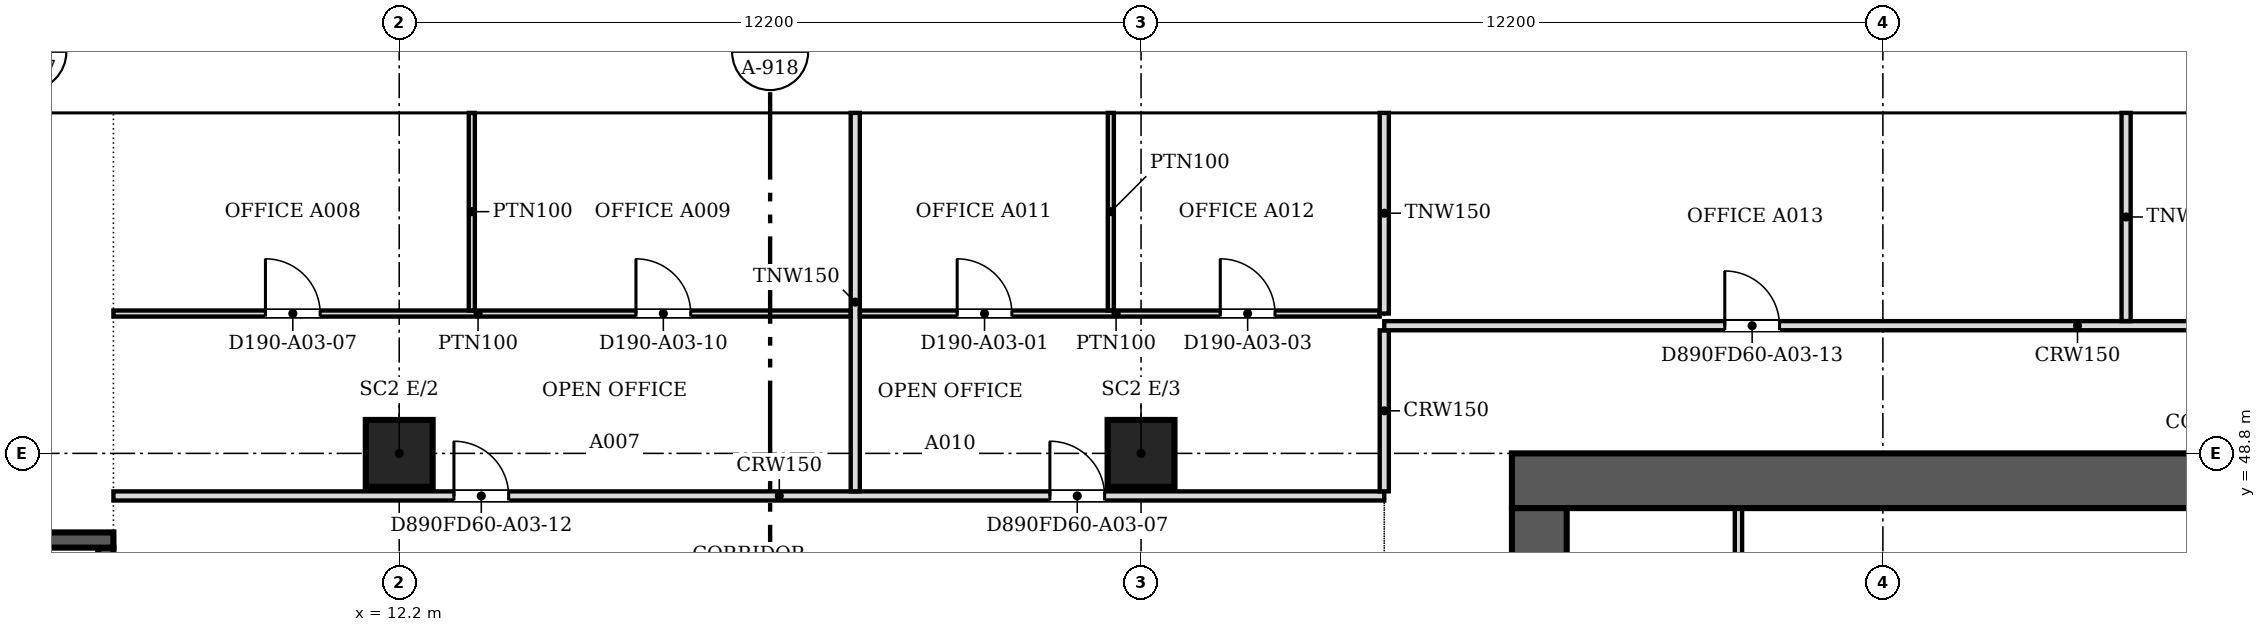
"""IFC4 building model, lengths in metres.
Left out: names, types, materials, properties, quantities, classifications, styles, units other than length and angle.
Written with IfcOpenShell. Run it as: python <this file> out.ifc"""

import sys

from ifc_helpers import new_model, si_unit, direction, frame, frame_2d, origin, origin_2d, place, context, subcontext, project, spatial, polyline, rectangle, outline, extrude, faceted_brep, source, transform, mapped, element, fill, save


model = new_model("IFC4")
c1 = context("Model", 3, precision=1e-05, world=origin(), true_north=direction((0.0, 1.0)))
c2 = subcontext(c1, "Body", "Model", "MODEL_VIEW")
j1 = project(units=[si_unit("LENGTHUNIT", "METRE"), si_unit("PLANEANGLEUNIT", "RADIAN")], contexts=[c1])
p1 = place(None, origin())
s1 = spatial("IfcSite", under=j1, at=p1, CompositionType="ELEMENT")
p2 = place(p1, origin())
s2 = spatial("IfcBuilding", under=s1, at=p2, CompositionType="ELEMENT")
p3 = place(p2, frame((0.0, 0.0, 41.0)))
s3 = spatial("IfcBuildingStorey", under=s2, at=p3, CompositionType="ELEMENT", Elevation=41.0)
for number, where, z_axis, x_axis in (
    (1, (12.2, 48.8, 0.0), (0.0, 0.0, 1.0), (1.0, 0.0, 0.0)),
    (2, (24.4, 48.8, 0.0), (0.0, 0.0, 1.0), (1.0, 0.0, 0.0)),
):
    element("IfcColumn", number, at=place(p3, frame(where, z_axis=z_axis, x_axis=x_axis)), inside=s3, PredefinedType="COLUMN", context=c2, shape_type="SweptSolid", body=[
        extrude(rectangle(XDim=1.1, YDim=1.1, at=origin_2d()), origin(), (0.0, 0.0, 1.0), 3.6),
    ])
m1 = source(origin(), c2, "Body", "SweptSolid", [
    extrude(outline(polyline([(3.05, 0.0), (6.1, 3.8), (3.05, 7.6), (0.0, 3.8), (3.05, 0.0)])), frame((0.0, 0.25, 0.0), z_axis=(0.0, -1.0, 0.0), x_axis=(1.0, 0.0, 0.0)), (0.0, 0.0, 1.0), 0.5),
])
p4 = place(p3, frame((45.75, 54.65, -3.8), z_axis=(0.0, 0.0, 1.0), x_axis=(-1.0, 0.0, 0.0)))
e3 = element("IfcWall", 3, at=p4, inside=s3, PredefinedType="SOLIDWALL", context=c2, shape_type="MappedRepresentation", body=[
    mapped(m1, transform((0.0, 0.0, 0.0), scale=1.0)),
])
m2 = source(origin(), c2, "Body", "SweptSolid", [
    extrude(outline(polyline([(3.05, 0.399), (5.78, 3.8), (3.05, 7.201), (0.321, 3.8), (3.05, 0.399)])), frame((0.0, 0.26, 0.0), z_axis=(0.0, -1.0, 0.0), x_axis=(1.0, 0.0, 0.0)), (0.0, 0.0, 1.0), 0.52),
])
p5 = place(p4, origin())
e4 = element("IfcOpeningElement", 4, at=p5, cuts=e3, PredefinedType="OPENING", context=c2, shape_type="MappedRepresentation", body=[
    mapped(m2, transform((0.0, 0.0, 0.0), scale=1.0)),
])
m3 = source(origin(), c2, "Body", "Brep", [
    faceted_brep([(3.05, -0.25, 0.0), (6.1, -0.25, 3.8), (6.1, -0.25, 3.8), (3.05, -0.25, 7.6), (0.0, -0.25, 3.8), (0.0, 0.25, 3.8), (3.05, 0.25, 7.6), (6.1, 0.25, 3.8), (6.1, 0.25, 3.8), (3.05, 0.25, 0.0)], [[[0, 1, 2, 3, 4]], [[5, 6, 7, 8, 9]], [[9, 8, 1, 0]], [[7, 6, 3, 2]], [[6, 5, 4, 3]], [[5, 9, 0, 4]], [[1, 8, 7, 2]]]),
])
p6 = place(p3, frame((39.65, 54.65, -3.8), z_axis=(0.0, 0.0, 1.0), x_axis=(-1.0, 0.0, 0.0)))
e5 = element("IfcWall", 5, at=p6, inside=s3, PredefinedType="SOLIDWALL", context=c2, shape_type="MappedRepresentation", body=[
    mapped(m3, transform((0.0, 0.0, 0.0), scale=1.0)),
])
p7 = place(p6, origin())
e6 = element("IfcOpeningElement", 6, at=p7, cuts=e5, PredefinedType="OPENING", context=c2, shape_type="MappedRepresentation", body=[
    mapped(m2, transform((0.0, 0.0, 0.0), scale=1.0)),
])
p8 = place(p3, frame((33.55, 54.65, -3.8), z_axis=(0.0, 0.0, 1.0), x_axis=(-1.0, 0.0, 0.0)))
e7 = element("IfcWall", 7, at=p8, inside=s3, PredefinedType="SOLIDWALL", context=c2, shape_type="MappedRepresentation", body=[
    mapped(m1, transform((0.0, 0.0, 0.0), scale=1.0)),
])
p9 = place(p8, origin())
e8 = element("IfcOpeningElement", 8, at=p9, cuts=e7, PredefinedType="OPENING", context=c2, shape_type="MappedRepresentation", body=[
    mapped(m2, transform((0.0, 0.0, 0.0), scale=1.0)),
])
p10 = place(p3, frame((27.45, 54.65, -3.8), z_axis=(0.0, 0.0, 1.0), x_axis=(-1.0, 0.0, 0.0)))
e9 = element("IfcWall", 9, at=p10, inside=s3, PredefinedType="SOLIDWALL", context=c2, shape_type="MappedRepresentation", body=[
    mapped(m3, transform((0.0, 0.0, 0.0), scale=1.0)),
])
p11 = place(p10, origin())
e10 = element("IfcOpeningElement", 10, at=p11, cuts=e9, PredefinedType="OPENING", context=c2, shape_type="MappedRepresentation", body=[
    mapped(m2, transform((0.0, 0.0, 0.0), scale=1.0)),
])
p12 = place(p3, frame((21.35, 54.65, -3.8), z_axis=(0.0, 0.0, 1.0), x_axis=(-1.0, 0.0, 0.0)))
e11 = element("IfcWall", 11, at=p12, inside=s3, PredefinedType="SOLIDWALL", context=c2, shape_type="MappedRepresentation", body=[
    mapped(m1, transform((0.0, 0.0, 0.0), scale=1.0)),
])
p13 = place(p12, origin())
e12 = element("IfcOpeningElement", 12, at=p13, cuts=e11, PredefinedType="OPENING", context=c2, shape_type="MappedRepresentation", body=[
    mapped(m2, transform((0.0, 0.0, 0.0), scale=1.0)),
])
p14 = place(p3, frame((15.25, 54.65, -3.8), z_axis=(0.0, 0.0, 1.0), x_axis=(-1.0, 0.0, 0.0)))
e13 = element("IfcWall", 13, at=p14, inside=s3, PredefinedType="SOLIDWALL", context=c2, shape_type="MappedRepresentation", body=[
    mapped(m1, transform((0.0, 0.0, 0.0), scale=1.0)),
])
p15 = place(p14, origin())
e14 = element("IfcOpeningElement", 14, at=p15, cuts=e13, PredefinedType="OPENING", context=c2, shape_type="MappedRepresentation", body=[
    mapped(m2, transform((0.0, 0.0, 0.0), scale=1.0)),
])
m4 = source(origin(), c2, "Body", "Brep", [
    faceted_brep([(3.003, -0.25, 0.0), (3.05, -0.25, 0.06), (3.05, -0.25, 7.54), (3.003, -0.25, 7.6), (0.0, -0.25, 3.8), (0.0, 0.25, 3.8), (2.957, 0.25, 7.541), (2.957, 0.25, 0.059), (3.003, 0.0, 0.0), (3.003, 0.0, 7.6)], [[[0, 1, 2, 3, 4]], [[5, 6, 7]], [[1, 0, 8]], [[9, 3, 2]], [[6, 5, 4, 3, 9]], [[5, 7, 8, 0, 4]], [[1, 8, 7, 6, 9, 2]]]),
])
p16 = place(p3, frame((9.15, 54.65, -3.8), z_axis=(0.0, 0.0, 1.0), x_axis=(-1.0, 0.0, 0.0)))
e15 = element("IfcWall", 15, at=p16, inside=s3, PredefinedType="SOLIDWALL", context=c2, shape_type="MappedRepresentation", body=[
    mapped(m4, transform((0.0, 0.0, 0.0), scale=1.0)),
])
m5 = source(origin(), c2, "Body", "SweptSolid", [
    extrude(outline(polyline([(2.803, 6.944), (0.319, 3.8), (2.803, 0.656), (2.803, 6.944)])), frame((0.0, 0.26, 0.0), z_axis=(0.0, -1.0, 0.0), x_axis=(1.0, 0.0, 0.0)), (0.0, 0.0, 1.0), 0.52),
])
p17 = place(p16, origin())
e16 = element("IfcOpeningElement", 16, at=p17, cuts=e15, PredefinedType="OPENING", context=c2, shape_type="MappedRepresentation", body=[
    mapped(m5, transform((0.0, 0.0, 0.0), scale=1.0)),
])
p18 = place(p2, frame((0.0, 0.0, 44.8)))
s4 = spatial("IfcBuildingStorey", under=s2, at=p18, CompositionType="ELEMENT", Elevation=44.8)
p19 = place(p18, frame((42.7, 54.65, -3.8), z_axis=(0.0, 0.0, 1.0), x_axis=(-1.0, 0.0, 0.0)))
e17 = element("IfcWall", 17, at=p19, inside=s4, PredefinedType="SOLIDWALL", context=c2, shape_type="MappedRepresentation", body=[
    mapped(m3, transform((0.0, 0.0, 0.0), scale=1.0)),
])
p20 = place(p19, origin())
e18 = element("IfcOpeningElement", 18, at=p20, cuts=e17, PredefinedType="OPENING", context=c2, shape_type="MappedRepresentation", body=[
    mapped(m2, transform((0.0, 0.0, 0.0), scale=1.0)),
])
p21 = place(p18, frame((36.6, 54.65, -3.8), z_axis=(0.0, 0.0, 1.0), x_axis=(-1.0, 0.0, 0.0)))
e19 = element("IfcWall", 19, at=p21, inside=s4, PredefinedType="SOLIDWALL", context=c2, shape_type="MappedRepresentation", body=[
    mapped(m1, transform((0.0, 0.0, 0.0), scale=1.0)),
])
p22 = place(p21, origin())
e20 = element("IfcOpeningElement", 20, at=p22, cuts=e19, PredefinedType="OPENING", context=c2, shape_type="MappedRepresentation", body=[
    mapped(m2, transform((0.0, 0.0, 0.0), scale=1.0)),
])
p23 = place(p18, frame((30.5, 54.65, -3.8), z_axis=(0.0, 0.0, 1.0), x_axis=(-1.0, 0.0, 0.0)))
e21 = element("IfcWall", 21, at=p23, inside=s4, PredefinedType="SOLIDWALL", context=c2, shape_type="MappedRepresentation", body=[
    mapped(m1, transform((0.0, 0.0, 0.0), scale=1.0)),
])
p24 = place(p23, origin())
e22 = element("IfcOpeningElement", 22, at=p24, cuts=e21, PredefinedType="OPENING", context=c2, shape_type="MappedRepresentation", body=[
    mapped(m2, transform((0.0, 0.0, 0.0), scale=1.0)),
])
p25 = place(p18, frame((24.4, 54.65, -3.8), z_axis=(0.0, 0.0, 1.0), x_axis=(-1.0, 0.0, 0.0)))
e23 = element("IfcWall", 23, at=p25, inside=s4, PredefinedType="SOLIDWALL", context=c2, shape_type="MappedRepresentation", body=[
    mapped(m3, transform((0.0, 0.0, 0.0), scale=1.0)),
])
p26 = place(p25, origin())
e24 = element("IfcOpeningElement", 24, at=p26, cuts=e23, PredefinedType="OPENING", context=c2, shape_type="MappedRepresentation", body=[
    mapped(m2, transform((0.0, 0.0, 0.0), scale=1.0)),
])
p27 = place(p18, frame((18.3, 54.65, -3.8), z_axis=(0.0, 0.0, 1.0), x_axis=(-1.0, 0.0, 0.0)))
e25 = element("IfcWall", 25, at=p27, inside=s4, PredefinedType="SOLIDWALL", context=c2, shape_type="MappedRepresentation", body=[
    mapped(m1, transform((0.0, 0.0, 0.0), scale=1.0)),
])
p28 = place(p27, origin())
e26 = element("IfcOpeningElement", 26, at=p28, cuts=e25, PredefinedType="OPENING", context=c2, shape_type="MappedRepresentation", body=[
    mapped(m2, transform((0.0, 0.0, 0.0), scale=1.0)),
])
m6 = source(origin(), c2, "Body", "Brep", [
    faceted_brep([(3.05, -0.25, 0.0), (6.053, -0.25, 3.8), (3.05, -0.25, 7.6), (0.0, -0.25, 3.8), (0.0, 0.25, 3.8), (3.05, 0.25, 7.6), (6.007, 0.25, 3.859), (6.007, 0.25, 3.741), (3.05, 0.25, 0.0), (6.053, 0.0, 3.8)], [[[0, 1, 2, 3]], [[4, 5, 6, 7, 8]], [[8, 7, 9, 1, 0]], [[6, 5, 2, 1, 9]], [[5, 4, 3, 2]], [[4, 8, 0, 3]], [[9, 7, 6]]]),
])
p29 = place(p18, frame((12.2, 54.65, -3.8), z_axis=(0.0, 0.0, 1.0), x_axis=(-1.0, 0.0, 0.0)))
e27 = element("IfcWall", 27, at=p29, inside=s4, PredefinedType="SOLIDWALL", context=c2, shape_type="MappedRepresentation", body=[
    mapped(m6, transform((0.0, 0.0, 0.0), scale=1.0)),
])
m7 = source(origin(), c2, "Body", "SweptSolid", [
    extrude(outline(polyline([(3.049, 0.401), (5.735, 3.8), (3.049, 7.199), (0.321, 3.8), (3.049, 0.401)])), frame((0.0, 0.26, 0.0), z_axis=(0.0, -1.0, 0.0), x_axis=(1.0, 0.0, 0.0)), (0.0, 0.0, 1.0), 0.52),
])
p30 = place(p29, origin())
e28 = element("IfcOpeningElement", 28, at=p30, cuts=e27, PredefinedType="OPENING", context=c2, shape_type="MappedRepresentation", body=[
    mapped(m7, transform((0.0, 0.0, 0.0), scale=1.0)),
])
p31 = place(p3, frame((30.95, 25.3, 0.0), z_axis=(0.0, 0.0, 1.0), x_axis=(0.0, 1.0, 0.0)))
e29 = element("IfcWall", 29, at=p31, inside=s3, PredefinedType="SHEAR", context=c2, shape_type="SweptSolid", body=[
    extrude(rectangle(XDim=22.6, YDim=0.9, at=frame_2d((11.3, 0.0))), origin(), (0.0, 0.0, 1.0), 3.8),
])
m8 = source(origin(), c2, "Body", "SweptSolid", [
    extrude(rectangle(XDim=2.1, YDim=2.4, at=frame_2d((1.05, 1.2))), frame((0.0, 0.46, 0.0), z_axis=(0.0, -1.0, 0.0), x_axis=(1.0, 0.0, 0.0)), (0.0, 0.0, 1.0), 0.92),
])
p32 = place(p31, frame((4.5, 0.0, 0.0)))
e30 = element("IfcOpeningElement", 30, at=p32, cuts=e29, PredefinedType="OPENING", context=c2, shape_type="MappedRepresentation", body=[
    mapped(m8, transform((0.0, 0.0, 0.0), scale=1.0)),
])
p33 = place(p31, frame((16.0, 0.0, 0.0)))
e31 = element("IfcOpeningElement", 31, at=p33, cuts=e29, PredefinedType="OPENING", context=c2, shape_type="MappedRepresentation", body=[
    mapped(m8, transform((0.0, 0.0, 0.0), scale=1.0)),
])
p34 = place(p3, frame((30.5, 48.35, 0.0), z_axis=(0.0, 0.0, 1.0), x_axis=(1.0, 0.0, 0.0)))
e32 = element("IfcWall", 32, at=p34, inside=s3, PredefinedType="SHEAR", context=c2, shape_type="SweptSolid", body=[
    extrude(rectangle(XDim=24.4, YDim=0.9, at=frame_2d((12.2, 0.0))), origin(), (0.0, 0.0, 1.0), 3.8),
])
p35 = place(p3, frame((34.225, 44.96, 0.0), z_axis=(0.0, 0.0, 1.0), x_axis=(0.0, 1.0, 0.0)))
e33 = element("IfcWall", 33, at=p35, inside=s3, PredefinedType="PARTITIONING", context=c2, shape_type="SweptSolid", body=[
    extrude(rectangle(XDim=2.94, YDim=0.12, at=frame_2d((1.47, 0.0))), origin(), (0.0, 0.0, 1.0), 3.6),
])
p36 = place(p3, frame((3.6, 47.375, 0.0), z_axis=(0.0, 0.0, 1.0), x_axis=(1.0, 0.0, 0.0)))
e34 = element("IfcWall", 34, at=p36, inside=s3, PredefinedType="SOLIDWALL", context=c2, shape_type="SweptSolid", body=[
    extrude(rectangle(XDim=3.9, YDim=0.25, at=frame_2d((1.95, 0.0))), origin(), (0.0, 0.0, 1.0), 3.8),
])
p37 = place(p3, frame((7.375, 47.25, 0.0), z_axis=(0.0, 0.0, 1.0), x_axis=(0.0, -1.0, 0.0)))
e35 = element("IfcWall", 35, at=p37, inside=s3, PredefinedType="SOLIDWALL", context=c2, shape_type="SweptSolid", body=[
    extrude(rectangle(XDim=8.0, YDim=0.25, at=frame_2d((4.0, 0.0))), origin(), (0.0, 0.0, 1.0), 3.8),
])
m9 = source(origin(), c2, "Body", "SweptSolid", [
    extrude(rectangle(XDim=1.2, YDim=2.1, at=frame_2d((0.6, 1.05))), frame((0.0, 0.135, 0.0), z_axis=(0.0, -1.0, 0.0), x_axis=(1.0, 0.0, 0.0)), (0.0, 0.0, 1.0), 0.27),
])
p38 = place(p37, frame((0.15, 0.0, 0.0)))
e36 = element("IfcOpeningElement", 36, at=p38, cuts=e35, PredefinedType="OPENING", context=c2, shape_type="MappedRepresentation", body=[
    mapped(m9, transform((0.0, 0.0, 0.0), scale=1.0)),
])
p39 = place(p3, frame((7.5, 48.1, 0.0), z_axis=(0.0, 0.0, 1.0), x_axis=(1.0, 0.0, 0.0)))
e37 = element("IfcWall", 37, at=p39, inside=s3, PredefinedType="PARTITIONING", context=c2, shape_type="SweptSolid", body=[
    extrude(rectangle(XDim=20.9, YDim=0.15, at=frame_2d((10.45, 0.0))), origin(), (0.0, 0.0, 1.0), 3.067),
])
m10 = source(origin(), c2, "Body", "SweptSolid", [
    extrude(rectangle(XDim=0.9, YDim=2.1, at=frame_2d((0.45, 1.05))), frame((0.0, 0.085, 0.0), z_axis=(0.0, -1.0, 0.0), x_axis=(1.0, 0.0, 0.0)), (0.0, 0.0, 1.0), 0.17),
])
p40 = place(p39, frame((15.401, 0.0, 0.0)))
e38 = element("IfcOpeningElement", 38, at=p40, cuts=e37, PredefinedType="OPENING", context=c2, shape_type="MappedRepresentation", body=[
    mapped(m10, transform((0.0, 0.0, 0.0), scale=1.0)),
])
p41 = place(p39, frame((5.6, 0.0, 0.0)))
e39 = element("IfcOpeningElement", 39, at=p41, cuts=e37, PredefinedType="OPENING", context=c2, shape_type="MappedRepresentation", body=[
    mapped(m10, transform((0.0, 0.0, 0.0), scale=1.0)),
])
p42 = place(p3, frame((19.7, 48.176, 0.0), z_axis=(0.0, 0.0, 1.0), x_axis=(0.0, 1.0, 0.0)))
e40 = element("IfcWall", 40, at=p42, inside=s3, PredefinedType="PARTITIONING", context=c2, shape_type="SweptSolid", body=[
    extrude(rectangle(XDim=6.224, YDim=0.15, at=frame_2d((3.112, 0.0))), origin(), (0.0, 0.0, 1.0), 3.067),
])
p43 = place(p3, frame((28.4, 48.176, 0.0), z_axis=(0.0, 0.0, 1.0), x_axis=(0.0, 1.0, 0.0)))
e41 = element("IfcWall", 41, at=p43, inside=s3, PredefinedType="PARTITIONING", context=c2, shape_type="SweptSolid", body=[
    extrude(rectangle(XDim=2.648, YDim=0.15, at=frame_2d((1.324, 0.0))), origin(), (0.0, 0.0, 1.0), 3.067),
])
p44 = place(p3, frame((28.4, 50.9, 0.0), z_axis=(0.0, 0.0, 1.0), x_axis=(1.0, 0.0, 0.0)))
e42 = element("IfcWall", 42, at=p44, inside=s3, PredefinedType="PARTITIONING", context=c2, shape_type="SweptSolid", body=[
    extrude(rectangle(XDim=31.254, YDim=0.15, at=frame_2d((15.627, 0.0))), origin(), (0.0, 0.0, 1.0), 3.067),
])
p45 = place(p44, frame((16.301, 0.0, 0.0)))
e43 = element("IfcOpeningElement", 43, at=p45, cuts=e42, PredefinedType="OPENING", context=c2, shape_type="MappedRepresentation", body=[
    mapped(m10, transform((0.0, 0.0, 0.0), scale=1.0)),
])
p46 = place(p44, frame((25.85, 0.0, 0.0)))
e44 = element("IfcOpeningElement", 44, at=p46, cuts=e42, PredefinedType="OPENING", context=c2, shape_type="MappedRepresentation", body=[
    mapped(m10, transform((0.0, 0.0, 0.0), scale=1.0)),
])
p47 = place(p44, frame((5.6, 0.0, 0.0)))
e45 = element("IfcOpeningElement", 45, at=p47, cuts=e42, PredefinedType="OPENING", context=c2, shape_type="MappedRepresentation", body=[
    mapped(m10, transform((0.0, 0.0, 0.0), scale=1.0)),
])
p48 = place(p3, frame((40.6, 50.976, 0.0), z_axis=(0.0, 0.0, 1.0), x_axis=(0.0, 1.0, 0.0)))
e46 = element("IfcWall", 46, at=p48, inside=s3, PredefinedType="PARTITIONING", context=c2, shape_type="SweptSolid", body=[
    extrude(rectangle(XDim=3.424, YDim=0.15, at=frame_2d((1.712, 0.0))), origin(), (0.0, 0.0, 1.0), 3.067),
])
p49 = place(p3, frame((7.5, 51.1, 0.0), z_axis=(0.0, 0.0, 1.0), x_axis=(1.0, 0.0, 0.0)))
e47 = element("IfcWall", 47, at=p49, inside=s3, PredefinedType="PARTITIONING", context=c2, shape_type="SweptSolid", body=[
    extrude(rectangle(XDim=12.124, YDim=0.1, at=frame_2d((6.062, 0.0))), origin(), (0.0, 0.0, 1.0), 3.067),
])
m11 = source(origin(), c2, "Body", "SweptSolid", [
    extrude(rectangle(XDim=0.9, YDim=2.1, at=frame_2d((0.45, 1.05))), frame((0.0, 0.06, 0.0), z_axis=(0.0, -1.0, 0.0), x_axis=(1.0, 0.0, 0.0)), (0.0, 0.0, 1.0), 0.12),
])
p50 = place(p49, frame((2.5, 0.0, 0.0)))
e48 = element("IfcOpeningElement", 48, at=p50, cuts=e47, PredefinedType="OPENING", context=c2, shape_type="MappedRepresentation", body=[
    mapped(m11, transform((0.0, 0.0, 0.0), scale=1.0)),
])
p51 = place(p49, frame((8.594, 0.0, 0.0)))
e49 = element("IfcOpeningElement", 49, at=p51, cuts=e47, PredefinedType="OPENING", context=c2, shape_type="MappedRepresentation", body=[
    mapped(m11, transform((0.0, 0.0, 0.0), scale=1.0)),
])
p52 = place(p3, frame((19.776, 51.1, 0.0), z_axis=(0.0, 0.0, 1.0), x_axis=(1.0, 0.0, 0.0)))
e50 = element("IfcWall", 50, at=p52, inside=s3, PredefinedType="PARTITIONING", context=c2, shape_type="SweptSolid", body=[
    extrude(rectangle(XDim=8.548, YDim=0.1, at=frame_2d((4.274, 0.0))), origin(), (0.0, 0.0, 1.0), 3.067),
])
p53 = place(p52, frame((1.6, 0.0, 0.0)))
e51 = element("IfcOpeningElement", 51, at=p53, cuts=e50, PredefinedType="OPENING", context=c2, shape_type="MappedRepresentation", body=[
    mapped(m11, transform((0.0, 0.0, 0.0), scale=1.0)),
])
p54 = place(p52, frame((5.927, 0.0, 0.0)))
e52 = element("IfcOpeningElement", 52, at=p54, cuts=e50, PredefinedType="OPENING", context=c2, shape_type="MappedRepresentation", body=[
    mapped(m11, transform((0.0, 0.0, 0.0), scale=1.0)),
])
p55 = place(p3, frame((28.4, 51.1, 0.0), z_axis=(0.0, 0.0, 1.0), x_axis=(0.0, 1.0, 0.0)))
e53 = element("IfcWall", 53, at=p55, inside=s3, PredefinedType="PARTITIONING", context=c2, shape_type="SweptSolid", body=[
    extrude(rectangle(XDim=3.3, YDim=0.15, at=frame_2d((1.65, 0.0))), origin(), (0.0, 0.0, 1.0), 3.067),
])
for number, where, z_axis, x_axis in (
    (54, (13.394, 51.151, 0.0), (0.0, 0.0, 1.0), (0.0, 1.0, 0.0)),
    (55, (23.903, 51.151, 0.0), (0.0, 0.0, 1.0), (0.0, 1.0, 0.0)),
):
    element("IfcWall", number, at=place(p3, frame(where, z_axis=z_axis, x_axis=x_axis)), inside=s3, PredefinedType="PARTITIONING", context=c2, shape_type="SweptSolid", body=[
        extrude(rectangle(XDim=3.249, YDim=0.1, at=frame_2d((1.625, 0.0))), origin(), (0.0, 0.0, 1.0), 3.067),
    ])
m12 = source(origin(), c2, "Body", "SweptSolid", [
    extrude(rectangle(XDim=0.9, YDim=2.1, at=frame_2d((0.45, 1.05))), frame((0.0, 0.025, 0.0), z_axis=(0.0, -1.0, 0.0), x_axis=(1.0, 0.0, 0.0)), (0.0, 0.0, 1.0), 0.05),
])
p56 = place(p53, origin())
e56 = element("IfcDoor", 56, at=p56, inside=s3, OperationType="SINGLE_SWING_LEFT", PredefinedType="DOOR", context=c2, shape_type="MappedRepresentation", body=[
    mapped(m12, transform((0.0, 0.0, 0.0), scale=1.0)),
])
fill(e51, e56)
p57 = place(p54, origin())
e57 = element("IfcDoor", 57, at=p57, inside=s3, OperationType="SINGLE_SWING_LEFT", PredefinedType="DOOR", context=c2, shape_type="MappedRepresentation", body=[
    mapped(m12, transform((0.0, 0.0, 0.0), scale=1.0)),
])
fill(e52, e57)
p58 = place(p50, origin())
e58 = element("IfcDoor", 58, at=p58, inside=s3, OperationType="SINGLE_SWING_LEFT", PredefinedType="DOOR", context=c2, shape_type="MappedRepresentation", body=[
    mapped(m12, transform((0.0, 0.0, 0.0), scale=1.0)),
])
fill(e48, e58)
p59 = place(p51, origin())
e59 = element("IfcDoor", 59, at=p59, inside=s3, OperationType="SINGLE_SWING_LEFT", PredefinedType="DOOR", context=c2, shape_type="MappedRepresentation", body=[
    mapped(m12, transform((0.0, 0.0, 0.0), scale=1.0)),
])
fill(e49, e59)
p60 = place(p40, origin())
e60 = element("IfcDoor", 60, at=p60, inside=s3, OperationType="SINGLE_SWING_LEFT", PredefinedType="DOOR", context=c2, shape_type="MappedRepresentation", body=[
    mapped(m12, transform((0.0, 0.0, 0.0), scale=1.0)),
])
fill(e38, e60)
p61 = place(p41, origin())
e61 = element("IfcDoor", 61, at=p61, inside=s3, OperationType="SINGLE_SWING_LEFT", PredefinedType="DOOR", context=c2, shape_type="MappedRepresentation", body=[
    mapped(m12, transform((0.0, 0.0, 0.0), scale=1.0)),
])
fill(e39, e61)
p62 = place(p47, origin())
e62 = element("IfcDoor", 62, at=p62, inside=s3, OperationType="SINGLE_SWING_LEFT", PredefinedType="DOOR", context=c2, shape_type="MappedRepresentation", body=[
    mapped(m12, transform((0.0, 0.0, 0.0), scale=1.0)),
])
fill(e45, e62)
save(model, sys.argv[1])
